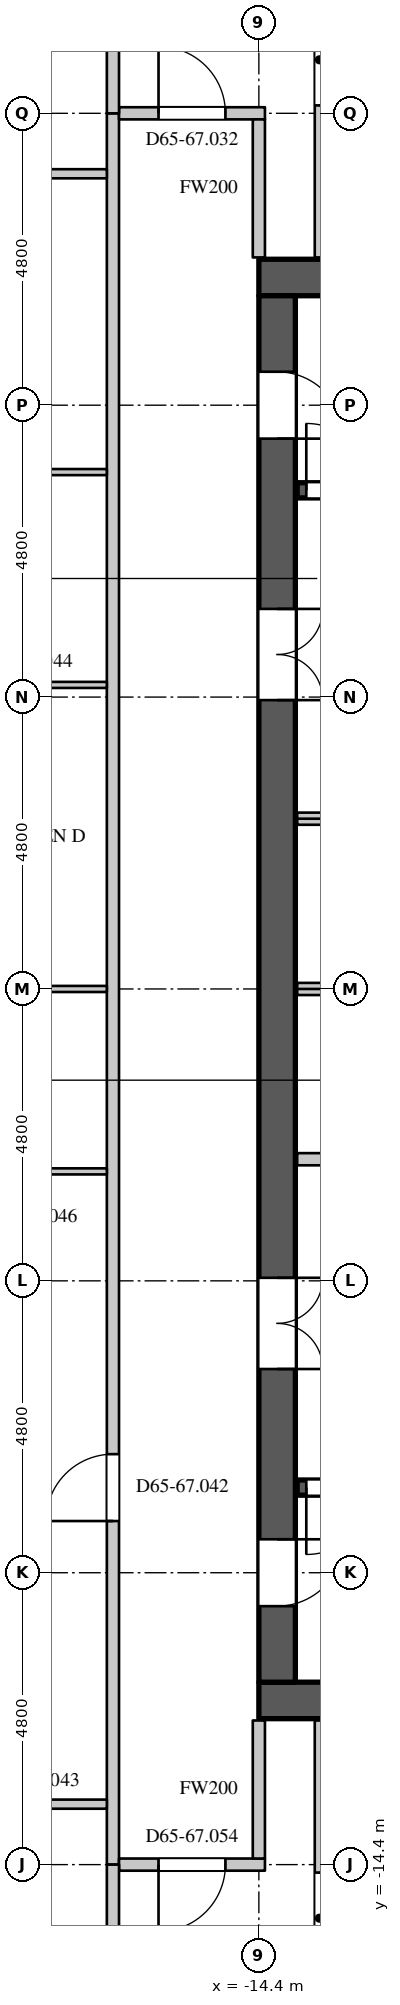
"""IFC4 building model, lengths in metres.
Left out: names, types, materials, properties, quantities, classifications, styles, units other than length and angle.
Written with IfcOpenShell. Run it as: python <this file> out.ifc"""

import sys

from ifc_helpers import new_model, si_unit, direction, frame, frame_2d, origin, place, context, subcontext, project, spatial, rectangle, extrude, element, fill, save


model = new_model("IFC4")
c1 = context("Model", 3, precision=1e-05, world=origin(), true_north=direction((0.0, 1.0)))
c2 = subcontext(c1, "Body", "Model", "MODEL_VIEW")
j1 = project(units=[si_unit("LENGTHUNIT", "METRE"), si_unit("PLANEANGLEUNIT", "RADIAN")], contexts=[c1])
p1 = place(None, origin())
s1 = spatial("IfcSite", under=j1, at=p1, CompositionType="ELEMENT")
p2 = place(p1, origin())
s2 = spatial("IfcBuilding", under=s1, at=p2, CompositionType="ELEMENT")
p3 = place(p2, frame((0.0, 0.0, 281.1)))
s3 = spatial("IfcBuildingStorey", under=s2, at=p3, CompositionType="ELEMENT", Elevation=281.1)
for number, where, z_axis, x_axis in (
    (1, (-14.4, 11.7, 0.0), (0.0, 0.0, 1.0), (1.0, 0.0, 0.0)),
    (2, (-14.4, -11.7, 0.0), (0.0, 0.0, 1.0), (1.0, 0.0, 0.0)),
):
    element("IfcWall", number, at=place(p3, frame(where, z_axis=z_axis, x_axis=x_axis)), inside=s3, PredefinedType="SHEAR", context=c2, shape_type="SweptSolid", body=[
        extrude(rectangle(XDim=28.8, YDim=0.6, at=frame_2d((14.4, 0.0))), origin(), (0.0, 0.0, 1.0), 4.2),
    ])
p4 = place(p3, frame((-14.1, -11.4, 0.0), z_axis=(0.0, 0.0, 1.0), x_axis=(0.0, 1.0, 0.0)))
e3 = element("IfcWall", 3, at=p4, inside=s3, PredefinedType="SHEAR", context=c2, shape_type="SweptSolid", body=[
    extrude(rectangle(XDim=22.8, YDim=0.6, at=frame_2d((11.4, 0.0))), origin(), (0.0, 0.0, 1.0), 4.2),
])
p5 = place(p4, frame((20.45, 0.0, 0.0)))
e4 = element("IfcOpeningElement", 4, at=p5, cuts=e3, PredefinedType="OPENING", context=c2, shape_type="SweptSolid", body=[
    extrude(rectangle(XDim=1.1, YDim=2.2, at=frame_2d((0.55, 1.1))), frame((0.0, 0.31, 0.0), z_axis=(0.0, -1.0, 0.0), x_axis=(1.0, 0.0, 0.0)), (0.0, 0.0, 1.0), 0.62),
])
p6 = place(p4, frame((1.25, 0.0, 0.0)))
e5 = element("IfcOpeningElement", 5, at=p6, cuts=e3, PredefinedType="OPENING", context=c2, shape_type="SweptSolid", body=[
    extrude(rectangle(XDim=1.1, YDim=2.2, at=frame_2d((0.55, 1.1))), frame((0.0, 0.31, 0.0), z_axis=(0.0, -1.0, 0.0), x_axis=(1.0, 0.0, 0.0)), (0.0, 0.0, 1.0), 0.62),
])
p7 = place(p4, frame((16.15, 0.0, 0.0)))
e6 = element("IfcOpeningElement", 6, at=p7, cuts=e3, PredefinedType="OPENING", context=c2, shape_type="SweptSolid", body=[
    extrude(rectangle(XDim=1.5, YDim=2.4, at=frame_2d((0.75, 1.2))), frame((0.0, 0.31, 0.0), z_axis=(0.0, -1.0, 0.0), x_axis=(1.0, 0.0, 0.0)), (0.0, 0.0, 1.0), 0.62),
])
p8 = place(p4, frame((5.15, 0.0, 0.0)))
e7 = element("IfcOpeningElement", 7, at=p8, cuts=e3, PredefinedType="OPENING", context=c2, shape_type="SweptSolid", body=[
    extrude(rectangle(XDim=1.5, YDim=2.4, at=frame_2d((0.75, 1.2))), frame((0.0, 0.31, 0.0), z_axis=(0.0, -1.0, 0.0), x_axis=(1.0, 0.0, 0.0)), (0.0, 0.0, 1.0), 0.62),
])
p9 = place(p3, frame((-16.8, -14.4, 0.0), z_axis=(0.0, 0.0, 1.0), x_axis=(0.0, 1.0, 0.0)))
e8 = element("IfcWall", 8, at=p9, inside=s3, PredefinedType="PARTITIONING", context=c2, shape_type="SweptSolid", body=[
    extrude(rectangle(XDim=28.8, YDim=0.2, at=frame_2d((14.4, 0.0))), origin(), (0.0, 0.0, 1.0), 3.95),
])
p10 = place(p9, frame((5.65, 0.0, 0.0)))
e9 = element("IfcOpeningElement", 9, at=p10, cuts=e8, PredefinedType="OPENING", context=c2, shape_type="SweptSolid", body=[
    extrude(rectangle(XDim=1.1, YDim=2.4, at=frame_2d((0.55, 1.2))), frame((0.0, 0.11, 0.0), z_axis=(0.0, -1.0, 0.0), x_axis=(1.0, 0.0, 0.0)), (0.0, 0.0, 1.0), 0.22),
])
p11 = place(p3, frame((-16.7, -14.4, 0.0), z_axis=(0.0, 0.0, 1.0), x_axis=(1.0, 0.0, 0.0)))
e10 = element("IfcWall", 10, at=p11, inside=s3, PredefinedType="PARTITIONING", context=c2, shape_type="SweptSolid", body=[
    extrude(rectangle(XDim=2.4, YDim=0.2, at=frame_2d((1.2, 0.0))), origin(), (0.0, 0.0, 1.0), 3.95),
])
p12 = place(p11, frame((0.65, 0.0, 0.0)))
e11 = element("IfcOpeningElement", 11, at=p12, cuts=e10, PredefinedType="OPENING", context=c2, shape_type="SweptSolid", body=[
    extrude(rectangle(XDim=1.1, YDim=2.4, at=frame_2d((0.55, 1.2))), frame((0.0, 0.11, 0.0), z_axis=(0.0, -1.0, 0.0), x_axis=(1.0, 0.0, 0.0)), (0.0, 0.0, 1.0), 0.22),
])
p13 = place(p3, frame((-16.7, 14.4, 0.0), z_axis=(0.0, 0.0, 1.0), x_axis=(1.0, 0.0, 0.0)))
e12 = element("IfcWall", 12, at=p13, inside=s3, PredefinedType="PARTITIONING", context=c2, shape_type="SweptSolid", body=[
    extrude(rectangle(XDim=2.4, YDim=0.2, at=frame_2d((1.2, 0.0))), origin(), (0.0, 0.0, 1.0), 3.95),
])
p14 = place(p13, frame((0.65, 0.0, 0.0)))
e13 = element("IfcOpeningElement", 13, at=p14, cuts=e12, PredefinedType="OPENING", context=c2, shape_type="SweptSolid", body=[
    extrude(rectangle(XDim=1.1, YDim=2.4, at=frame_2d((0.55, 1.2))), frame((0.0, 0.11, 0.0), z_axis=(0.0, -1.0, 0.0), x_axis=(1.0, 0.0, 0.0)), (0.0, 0.0, 1.0), 0.22),
])
for number, where, z_axis, x_axis in (
    (14, (-14.4, -14.3, 0.0), (0.0, 0.0, 1.0), (0.0, 1.0, 0.0)),
    (15, (-14.4, 12.03, 0.0), (0.0, 0.0, 1.0), (0.0, 1.0, 0.0)),
):
    element("IfcWall", number, at=place(p3, frame(where, z_axis=z_axis, x_axis=x_axis)), inside=s3, PredefinedType="PARTITIONING", context=c2, shape_type="SweptSolid", body=[
        extrude(rectangle(XDim=2.27, YDim=0.2, at=frame_2d((1.135, 0.0))), origin(), (0.0, 0.0, 1.0), 3.95),
    ])
p15 = place(p3, frame((-25.224, -13.406, 0.0), z_axis=(0.0, 0.0, 1.0), x_axis=(1.0, 0.0, 0.0)))
e16 = element("IfcWall", 16, at=p15, inside=s3, PredefinedType="PARTITIONING", context=c2, shape_type="SweptSolid", body=[
    extrude(rectangle(XDim=8.324, YDim=0.15, at=frame_2d((4.162, 0.0))), origin(), (0.0, 0.0, 1.0), 3.95),
])
p16 = place(p15, frame((5.993, 0.0, 0.0)))
e17 = element("IfcOpeningElement", 17, at=p16, cuts=e16, PredefinedType="OPENING", context=c2, shape_type="SweptSolid", body=[
    extrude(rectangle(XDim=0.95, YDim=2.2, at=frame_2d((0.475, 1.1))), frame((0.0, 0.085, 0.0), z_axis=(0.0, -1.0, 0.0), x_axis=(1.0, 0.0, 0.0)), (0.0, 0.0, 1.0), 0.17),
])
p17 = place(p3, frame((-25.224, 13.406, 0.0), z_axis=(0.0, 0.0, 1.0), x_axis=(1.0, 0.0, 0.0)))
e18 = element("IfcWall", 18, at=p17, inside=s3, PredefinedType="PARTITIONING", context=c2, shape_type="SweptSolid", body=[
    extrude(rectangle(XDim=8.324, YDim=0.15, at=frame_2d((4.162, 0.0))), origin(), (0.0, 0.0, 1.0), 3.95),
])
p18 = place(p17, frame((1.693, 0.0, 0.0)))
e19 = element("IfcOpeningElement", 19, at=p18, cuts=e18, PredefinedType="OPENING", context=c2, shape_type="SweptSolid", body=[
    extrude(rectangle(XDim=1.5, YDim=2.2, at=frame_2d((0.75, 1.1))), frame((0.0, 0.085, 0.0), z_axis=(0.0, -1.0, 0.0), x_axis=(1.0, 0.0, 0.0)), (0.0, 0.0, 1.0), 0.17),
])
p19 = place(p3, frame((-13.406, -25.731, 0.0), z_axis=(0.0, 0.0, 1.0), x_axis=(0.0, 1.0, 0.0)))
e20 = element("IfcWall", 20, at=p19, inside=s3, PredefinedType="PARTITIONING", context=c2, shape_type="SweptSolid", body=[
    extrude(rectangle(XDim=13.701, YDim=0.15, at=frame_2d((6.851, 0.0))), origin(), (0.0, 0.0, 1.0), 3.3),
])
p20 = place(p19, frame((9.7, 0.0, 0.0)))
e21 = element("IfcOpeningElement", 21, at=p20, cuts=e20, PredefinedType="OPENING", context=c2, shape_type="SweptSolid", body=[
    extrude(rectangle(XDim=1.5, YDim=2.2, at=frame_2d((0.75, 1.1))), frame((0.0, 0.085, 0.0), z_axis=(0.0, -1.0, 0.0), x_axis=(1.0, 0.0, 0.0)), (0.0, 0.0, 1.0), 0.17),
])
p21 = place(p3, frame((-13.406, 12.03, 0.0), z_axis=(0.0, 0.0, 1.0), x_axis=(0.0, 1.0, 0.0)))
e22 = element("IfcWall", 22, at=p21, inside=s3, PredefinedType="PARTITIONING", context=c2, shape_type="SweptSolid", body=[
    extrude(rectangle(XDim=13.701, YDim=0.15, at=frame_2d((6.851, 0.0))), origin(), (0.0, 0.0, 1.0), 3.3),
])
p22 = place(p21, frame((2.5, 0.0, 0.0)))
e23 = element("IfcOpeningElement", 23, at=p22, cuts=e22, PredefinedType="OPENING", context=c2, shape_type="SweptSolid", body=[
    extrude(rectangle(XDim=1.5, YDim=2.2, at=frame_2d((0.75, 1.1))), frame((0.0, 0.085, 0.0), z_axis=(0.0, -1.0, 0.0), x_axis=(1.0, 0.0, 0.0)), (0.0, 0.0, 1.0), 0.17),
])
for number, where, z_axis, x_axis in (
    (24, (-16.8, -19.803, 0.0), (0.0, 0.0, 1.0), (0.0, 1.0, 0.0)),
    (25, (-16.8, 14.4, 0.0), (0.0, 0.0, 1.0), (0.0, 1.0, 0.0)),
):
    element("IfcWall", number, at=place(p3, frame(where, z_axis=z_axis, x_axis=x_axis)), inside=s3, PredefinedType="PARTITIONING", context=c2, shape_type="SweptSolid", body=[
        extrude(rectangle(XDim=5.403, YDim=0.2, at=frame_2d((2.702, 0.0))), origin(), (0.0, 0.0, 1.0), 3.95),
    ])
p23 = place(p3, frame((-13.77, -2.8, 0.0), z_axis=(0.0, 0.0, 1.0), x_axis=(1.0, 0.0, 0.0)))
e26 = element("IfcWall", 26, at=p23, inside=s3, PredefinedType="PARTITIONING", context=c2, shape_type="SweptSolid", body=[
    extrude(rectangle(XDim=3.37, YDim=0.2, at=frame_2d((1.685, 0.0))), origin(), (0.0, 0.0, 1.0), 3.95),
])
p24 = place(p23, frame((1.35, 0.0, 0.0)))
e27 = element("IfcOpeningElement", 27, at=p24, cuts=e26, PredefinedType="OPENING", context=c2, shape_type="SweptSolid", body=[
    extrude(rectangle(XDim=0.6, YDim=2.0, at=frame_2d((0.3, 1.0))), frame((0.0, 0.11, 0.0), z_axis=(0.0, -1.0, 0.0), x_axis=(1.0, 0.0, 0.0)), (0.0, 0.0, 1.0), 0.22),
])
p25 = place(p3, frame((-13.77, 0.0, 0.0), z_axis=(0.0, 0.0, 1.0), x_axis=(1.0, 0.0, 0.0)))
e28 = element("IfcWall", 28, at=p25, inside=s3, PredefinedType="PARTITIONING", context=c2, shape_type="SweptSolid", body=[
    extrude(rectangle(XDim=21.57, YDim=0.2, at=frame_2d((10.785, 0.0))), origin(), (0.0, 0.0, 1.0), 3.95),
])
p26 = place(p3, frame((-13.77, 2.8, 0.0), z_axis=(0.0, 0.0, 1.0), x_axis=(1.0, 0.0, 0.0)))
e29 = element("IfcWall", 29, at=p26, inside=s3, PredefinedType="PARTITIONING", context=c2, shape_type="SweptSolid", body=[
    extrude(rectangle(XDim=5.95, YDim=0.2, at=frame_2d((2.975, 0.0))), origin(), (0.0, 0.0, 1.0), 3.95),
])
p27 = place(p26, frame((1.1, 0.0, 0.0)))
e30 = element("IfcOpeningElement", 30, at=p27, cuts=e29, PredefinedType="OPENING", context=c2, shape_type="SweptSolid", body=[
    extrude(rectangle(XDim=1.1, YDim=2.2, at=frame_2d((0.55, 1.1))), frame((0.0, 0.11, 0.0), z_axis=(0.0, -1.0, 0.0), x_axis=(1.0, 0.0, 0.0)), (0.0, 0.0, 1.0), 0.22),
])
p28 = place(p26, frame((4.1, 0.0, 0.0)))
e31 = element("IfcOpeningElement", 31, at=p28, cuts=e29, PredefinedType="OPENING", context=c2, shape_type="SweptSolid", body=[
    extrude(rectangle(XDim=1.1, YDim=2.2, at=frame_2d((0.55, 1.1))), frame((0.0, 0.11, 0.0), z_axis=(0.0, -1.0, 0.0), x_axis=(1.0, 0.0, 0.0)), (0.0, 0.0, 1.0), 0.22),
])
p29 = place(p3, frame((-13.77, -8.2, 0.0), z_axis=(0.0, 0.0, 1.0), x_axis=(1.0, 0.0, 0.0)))
e32 = element("IfcWall", 32, at=p29, inside=s3, PredefinedType="SHEAR", context=c2, shape_type="SweptSolid", body=[
    extrude(rectangle(XDim=8.495, YDim=0.25, at=frame_2d((4.248, 0.0))), origin(), (0.0, 0.0, 1.0), 3.95),
])
p30 = place(p29, frame((0.15, 0.0, 0.0)))
e33 = element("IfcOpeningElement", 33, at=p30, cuts=e32, PredefinedType="OPENING", context=c2, shape_type="SweptSolid", body=[
    extrude(rectangle(XDim=1.1, YDim=2.2, at=frame_2d((0.55, 1.1))), frame((0.0, 0.135, 0.0), z_axis=(0.0, -1.0, 0.0), x_axis=(1.0, 0.0, 0.0)), (0.0, 0.0, 1.0), 0.27),
])
p31 = place(p3, frame((-13.77, 8.2, 0.0), z_axis=(0.0, 0.0, 1.0), x_axis=(1.0, 0.0, 0.0)))
e34 = element("IfcWall", 34, at=p31, inside=s3, PredefinedType="SHEAR", context=c2, shape_type="SweptSolid", body=[
    extrude(rectangle(XDim=8.495, YDim=0.25, at=frame_2d((4.248, 0.0))), origin(), (0.0, 0.0, 1.0), 3.95),
])
p32 = place(p31, frame((0.15, 0.0, 0.0)))
e35 = element("IfcOpeningElement", 35, at=p32, cuts=e34, PredefinedType="OPENING", context=c2, shape_type="SweptSolid", body=[
    extrude(rectangle(XDim=1.1, YDim=2.2, at=frame_2d((0.55, 1.1))), frame((0.0, 0.135, 0.0), z_axis=(0.0, -1.0, 0.0), x_axis=(1.0, 0.0, 0.0)), (0.0, 0.0, 1.0), 0.27),
])
p33 = place(p3, frame((-20.85, -3.0, 0.0), z_axis=(0.0, 0.0, 1.0), x_axis=(1.0, 0.0, 0.0)))
e36 = element("IfcWall", 36, at=p33, inside=s3, PredefinedType="PARTITIONING", context=c2, shape_type="SweptSolid", body=[
    extrude(rectangle(XDim=3.95, YDim=0.1, at=frame_2d((1.975, 0.0))), origin(), (0.0, 0.0, 1.0), 3.95),
])
p34 = place(p33, frame((1.5, 0.0, 0.0)))
e37 = element("IfcOpeningElement", 37, at=p34, cuts=e36, PredefinedType="OPENING", context=c2, shape_type="SweptSolid", body=[
    extrude(rectangle(XDim=0.9, YDim=2.2, at=frame_2d((0.45, 1.1))), frame((0.0, 0.06, 0.0), z_axis=(0.0, -1.0, 0.0), x_axis=(1.0, 0.0, 0.0)), (0.0, 0.0, 1.0), 0.12),
])
p35 = place(p3, frame((-20.88, 0.0, 0.0), z_axis=(0.0, 0.0, 1.0), x_axis=(1.0, 0.0, 0.0)))
e38 = element("IfcWall", 38, at=p35, inside=s3, PredefinedType="PARTITIONING", context=c2, shape_type="SweptSolid", body=[
    extrude(rectangle(XDim=3.98, YDim=0.1, at=frame_2d((1.99, 0.0))), origin(), (0.0, 0.0, 1.0), 3.95),
])
p36 = place(p3, frame((-20.825, 5.0, 0.0), z_axis=(0.0, 0.0, 1.0), x_axis=(1.0, 0.0, 0.0)))
e39 = element("IfcWall", 39, at=p36, inside=s3, PredefinedType="PARTITIONING", context=c2, shape_type="SweptSolid", body=[
    extrude(rectangle(XDim=3.925, YDim=0.1, at=frame_2d((1.962, 0.0))), origin(), (0.0, 0.0, 1.0), 3.95),
])
p37 = place(p36, frame((1.5, 0.0, 0.0)))
e40 = element("IfcOpeningElement", 40, at=p37, cuts=e39, PredefinedType="OPENING", context=c2, shape_type="SweptSolid", body=[
    extrude(rectangle(XDim=0.9, YDim=2.2, at=frame_2d((0.45, 1.1))), frame((0.0, 0.06, 0.0), z_axis=(0.0, -1.0, 0.0), x_axis=(1.0, 0.0, 0.0)), (0.0, 0.0, 1.0), 0.12),
])
p38 = place(p3, frame((-20.825, 8.5, 0.0), z_axis=(0.0, 0.0, 1.0), x_axis=(1.0, 0.0, 0.0)))
e41 = element("IfcWall", 41, at=p38, inside=s3, PredefinedType="PARTITIONING", context=c2, shape_type="SweptSolid", body=[
    extrude(rectangle(XDim=3.925, YDim=0.1, at=frame_2d((1.962, 0.0))), origin(), (0.0, 0.0, 1.0), 3.95),
])
p39 = place(p32, origin())
e42 = element("IfcDoor", 42, at=p39, inside=s3, OperationType="SINGLE_SWING_LEFT", PredefinedType="DOOR", context=c2, shape_type="SweptSolid", body=[
    extrude(rectangle(XDim=1.1, YDim=2.2, at=frame_2d((0.55, 1.1))), frame((0.0, 0.025, 0.0), z_axis=(0.0, -1.0, 0.0), x_axis=(1.0, 0.0, 0.0)), (0.0, 0.0, 1.0), 0.05),
])
fill(e35, e42)
p40 = place(p30, origin())
e43 = element("IfcDoor", 43, at=p40, inside=s3, OperationType="SINGLE_SWING_RIGHT", PredefinedType="DOOR", context=c2, shape_type="SweptSolid", body=[
    extrude(rectangle(XDim=1.1, YDim=2.2, at=frame_2d((0.55, 1.1))), frame((0.0, 0.025, 0.0), z_axis=(0.0, -1.0, 0.0), x_axis=(1.0, 0.0, 0.0)), (0.0, 0.0, 1.0), 0.05),
])
fill(e33, e43)
p41 = place(p5, origin())
e44 = element("IfcDoor", 44, at=p41, inside=s3, OperationType="SINGLE_SWING_RIGHT", PredefinedType="DOOR", context=c2, shape_type="SweptSolid", body=[
    extrude(rectangle(XDim=1.1, YDim=2.2, at=frame_2d((0.55, 1.1))), frame((0.0, -0.245, 0.0), z_axis=(0.0, -1.0, 0.0), x_axis=(1.0, 0.0, 0.0)), (0.0, 0.0, 1.0), 0.05),
])
fill(e4, e44)
p42 = place(p6, origin())
e45 = element("IfcDoor", 45, at=p42, inside=s3, OperationType="SINGLE_SWING_LEFT", PredefinedType="DOOR", context=c2, shape_type="SweptSolid", body=[
    extrude(rectangle(XDim=1.1, YDim=2.2, at=frame_2d((0.55, 1.1))), frame((0.0, -0.245, 0.0), z_axis=(0.0, -1.0, 0.0), x_axis=(1.0, 0.0, 0.0)), (0.0, 0.0, 1.0), 0.05),
])
fill(e5, e45)
p43 = place(p7, origin())
e46 = element("IfcDoor", 46, at=p43, inside=s3, OperationType="DOUBLE_DOOR_SINGLE_SWING", PredefinedType="DOOR", context=c2, shape_type="SweptSolid", body=[
    extrude(rectangle(XDim=1.5, YDim=2.4, at=frame_2d((0.75, 1.2))), frame((0.0, -0.245, 0.0), z_axis=(0.0, -1.0, 0.0), x_axis=(1.0, 0.0, 0.0)), (0.0, 0.0, 1.0), 0.05),
])
fill(e6, e46)
p44 = place(p8, origin())
e47 = element("IfcDoor", 47, at=p44, inside=s3, OperationType="DOUBLE_DOOR_SINGLE_SWING", PredefinedType="DOOR", context=c2, shape_type="SweptSolid", body=[
    extrude(rectangle(XDim=1.5, YDim=2.4, at=frame_2d((0.75, 1.2))), frame((0.0, -0.245, 0.0), z_axis=(0.0, -1.0, 0.0), x_axis=(1.0, 0.0, 0.0)), (0.0, 0.0, 1.0), 0.05),
])
fill(e7, e47)
p45 = place(p14, origin())
e48 = element("IfcDoor", 48, at=p45, inside=s3, OperationType="SINGLE_SWING_LEFT", PredefinedType="DOOR", context=c2, shape_type="SweptSolid", body=[
    extrude(rectangle(XDim=1.1, YDim=2.4, at=frame_2d((0.55, 1.2))), frame((0.0, 0.025, 0.0), z_axis=(0.0, -1.0, 0.0), x_axis=(1.0, 0.0, 0.0)), (0.0, 0.0, 1.0), 0.05),
])
fill(e13, e48)
p46 = place(p22, origin())
e49 = element("IfcDoor", 49, at=p46, inside=s3, OperationType="DOUBLE_DOOR_SINGLE_SWING", PredefinedType="DOOR", context=c2, shape_type="SweptSolid", body=[
    extrude(rectangle(XDim=1.5, YDim=2.2, at=frame_2d((0.75, 1.1))), frame((0.0, 0.025, 0.0), z_axis=(0.0, -1.0, 0.0), x_axis=(1.0, 0.0, 0.0)), (0.0, 0.0, 1.0), 0.05),
])
fill(e23, e49)
p47 = place(p10, origin())
e50 = element("IfcDoor", 50, at=p47, inside=s3, OperationType="SINGLE_SWING_LEFT", PredefinedType="DOOR", context=c2, shape_type="SweptSolid", body=[
    extrude(rectangle(XDim=1.1, YDim=2.4, at=frame_2d((0.55, 1.2))), frame((0.0, 0.025, 0.0), z_axis=(0.0, -1.0, 0.0), x_axis=(1.0, 0.0, 0.0)), (0.0, 0.0, 1.0), 0.05),
])
fill(e9, e50)
p48 = place(p12, origin())
e51 = element("IfcDoor", 51, at=p48, inside=s3, OperationType="SINGLE_SWING_RIGHT", PredefinedType="DOOR", context=c2, shape_type="SweptSolid", body=[
    extrude(rectangle(XDim=1.1, YDim=2.4, at=frame_2d((0.55, 1.2))), frame((0.0, 0.025, 0.0), z_axis=(0.0, -1.0, 0.0), x_axis=(1.0, 0.0, 0.0)), (0.0, 0.0, 1.0), 0.05),
])
fill(e11, e51)
p49 = place(p20, origin())
e52 = element("IfcDoor", 52, at=p49, inside=s3, OperationType="DOUBLE_DOOR_SINGLE_SWING", PredefinedType="DOOR", context=c2, shape_type="SweptSolid", body=[
    extrude(rectangle(XDim=1.5, YDim=2.2, at=frame_2d((0.75, 1.1))), frame((0.0, 0.025, 0.0), z_axis=(0.0, -1.0, 0.0), x_axis=(1.0, 0.0, 0.0)), (0.0, 0.0, 1.0), 0.05),
])
fill(e21, e52)
save(model, sys.argv[1])
